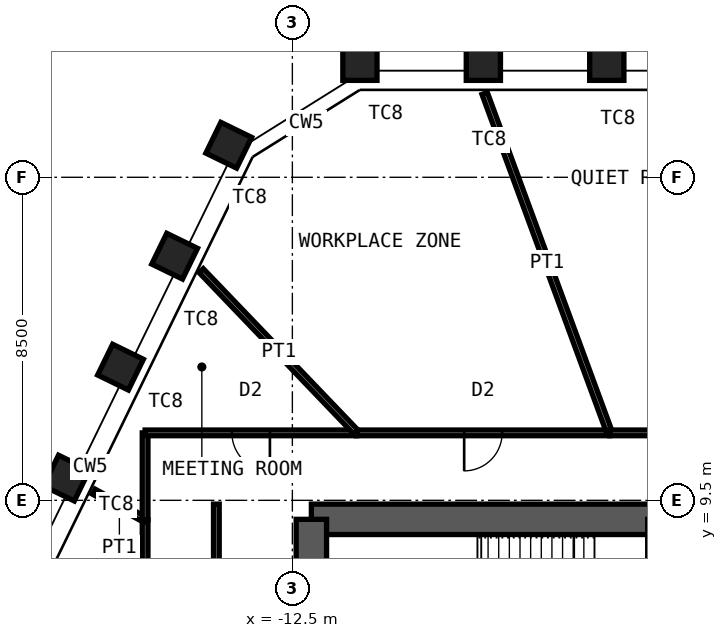
"""IFC4 building model, lengths in metres.
Left out: names, types, materials, properties, quantities, classifications, styles, units other than length and angle.
Written with IfcOpenShell. Run it as: python <this file> out.ifc"""

import sys

from ifc_helpers import new_model, si_unit, direction, frame, frame_2d, origin, origin_2d, place, context, subcontext, project, spatial, rectangle, hollow_rectangle, extrude, element, fill, save


model = new_model("IFC4")
c1 = context("Model", 3, precision=1e-05, world=origin(), true_north=direction((0.0, 1.0)))
c2 = subcontext(c1, "Body", "Model", "MODEL_VIEW")
j1 = project(units=[si_unit("LENGTHUNIT", "METRE"), si_unit("PLANEANGLEUNIT", "RADIAN")], contexts=[c1])
p1 = place(None, origin())
s1 = spatial("IfcSite", under=j1, at=p1, CompositionType="ELEMENT")
p2 = place(p1, origin())
s2 = spatial("IfcBuilding", under=s1, at=p2, CompositionType="ELEMENT")
p3 = place(p2, frame((0.0, 0.0, 308.2)))
s3 = spatial("IfcBuildingStorey", under=s2, at=p3, CompositionType="ELEMENT", Elevation=308.2)
for number, where, z_axis, x_axis in (
    (1, (-10.722, 21.0, 0.0), (0.0, 0.0, 1.0), (-1.0, 0.0, 0.0)),
    (2, (-7.474, 21.0, 0.0), (0.0, 0.0, 1.0), (-1.0, 0.0, 0.0)),
    (3, (-4.226, 21.0, 0.0), (0.0, 0.0, 1.0), (-1.0, 0.0, 0.0)),
    (4, (-18.446, 10.085, 0.0), (0.0, 0.0, 1.0), (-0.438, -0.899, 0.0)),
    (5, (-17.022, 13.004, 0.0), (0.0, 0.0, 1.0), (-0.438, -0.899, 0.0)),
    (6, (-15.598, 15.924, 0.0), (0.0, 0.0, 1.0), (-0.438, -0.899, 0.0)),
    (7, (-14.174, 18.843, 0.0), (0.0, 0.0, 1.0), (-0.438, -0.899, 0.0)),
):
    element("IfcColumn", number, at=place(p3, frame(where, z_axis=z_axis, x_axis=x_axis)), inside=s3, PredefinedType="COLUMN", context=c2, shape_type="SweptSolid", body=[
        extrude(hollow_rectangle(XDim=0.9, YDim=0.9, WallThickness=0.05, at=origin_2d()), origin(), (0.0, 0.0, 1.0), 4.2),
    ])
p4 = place(p3, frame((-12.0, 9.0, 0.0), z_axis=(0.0, 0.0, 1.0), x_axis=(1.0, 0.0, 0.0)))
e8 = element("IfcWall", 8, at=p4, inside=s3, PredefinedType="SHEAR", context=c2, shape_type="SweptSolid", body=[
    extrude(rectangle(XDim=24.0, YDim=0.8, at=frame_2d((12.0, 0.0))), origin(), (0.0, 0.0, 1.0), 4.2),
])
p5 = place(p4, frame((10.4, 0.0, 0.0)))
e9 = element("IfcOpeningElement", 9, at=p5, cuts=e8, PredefinedType="OPENING", context=c2, shape_type="SweptSolid", body=[
    extrude(rectangle(XDim=1.0, YDim=2.1, at=frame_2d((0.5, 1.05))), frame((0.0, 0.41, 0.0), z_axis=(0.0, -1.0, 0.0), x_axis=(1.0, 0.0, 0.0)), (0.0, 0.0, 1.0), 0.82),
])
p6 = place(p4, frame((17.6, 0.0, 0.0)))
e10 = element("IfcOpeningElement", 10, at=p6, cuts=e8, PredefinedType="OPENING", context=c2, shape_type="SweptSolid", body=[
    extrude(rectangle(XDim=0.9, YDim=2.1, at=frame_2d((0.45, 1.05))), frame((0.0, 0.41, 0.0), z_axis=(0.0, -1.0, 0.0), x_axis=(1.0, 0.0, 0.0)), (0.0, 0.0, 1.0), 0.82),
])
p7 = place(p4, frame((21.9, 0.0, 0.0)))
e11 = element("IfcOpeningElement", 11, at=p7, cuts=e8, PredefinedType="OPENING", context=c2, shape_type="SweptSolid", body=[
    extrude(rectangle(XDim=0.9, YDim=2.1, at=frame_2d((0.45, 1.05))), frame((0.0, 0.41, 0.0), z_axis=(0.0, -1.0, 0.0), x_axis=(1.0, 0.0, 0.0)), (0.0, 0.0, 1.0), 0.82),
])
p8 = place(p3, frame((-12.0, -9.0, 0.0), z_axis=(0.0, 0.0, 1.0), x_axis=(0.0, 1.0, 0.0)))
e12 = element("IfcWall", 12, at=p8, inside=s3, PredefinedType="SHEAR", context=c2, shape_type="SweptSolid", body=[
    extrude(rectangle(XDim=18.0, YDim=0.8, at=frame_2d((9.0, 0.0))), origin(), (0.0, 0.0, 1.0), 4.2),
])
p9 = place(p8, frame((8.1, 0.0, 0.0)))
e13 = element("IfcOpeningElement", 13, at=p9, cuts=e12, PredefinedType="OPENING", context=c2, shape_type="SweptSolid", body=[
    extrude(rectangle(XDim=1.8, YDim=2.1, at=frame_2d((0.9, 1.05))), frame((0.0, 0.41, 0.0), z_axis=(0.0, -1.0, 0.0), x_axis=(1.0, 0.0, 0.0)), (0.0, 0.0, 1.0), 0.82),
])
p10 = place(p3, frame((-16.375, 3.122, 0.0), z_axis=(0.0, 0.0, 1.0), x_axis=(0.0, 1.0, 0.0)))
e14 = element("IfcWall", 14, at=p10, inside=s3, PredefinedType="PARTITIONING", context=c2, shape_type="SweptSolid", body=[
    extrude(rectangle(XDim=5.865, YDim=0.15, at=frame_2d((2.933, 0.0))), origin(), (0.0, 0.0, 1.0), 4.03),
])
p11 = place(p10, frame((2.433, 0.0, 0.0)))
e15 = element("IfcOpeningElement", 15, at=p11, cuts=e14, PredefinedType="OPENING", context=c2, shape_type="SweptSolid", body=[
    extrude(rectangle(XDim=1.0, YDim=2.4, at=frame_2d((0.5, 1.2))), frame((0.0, 0.085, 0.0), z_axis=(0.0, -1.0, 0.0), x_axis=(1.0, 0.0, 0.0)), (0.0, 0.0, 1.0), 0.17),
])
p12 = place(p3, frame((-17.729, 9.73, 0.0), z_axis=(0.0, 0.0, 1.0), x_axis=(0.876636074137, -0.48115402266, 0.0)))
e16 = element("IfcWall", 16, at=p12, inside=s3, PredefinedType="PARTITIONING", context=c2, shape_type="SweptSolid", body=[
    extrude(rectangle(XDim=1.544, YDim=0.15, at=frame_2d((0.772, 0.0))), origin(), (0.0, 0.0, 1.0), 3.33),
])
p13 = place(p3, frame((-16.375, 8.987, 0.0), z_axis=(0.0, 0.0, 1.0), x_axis=(0.0, 1.0, 0.0)))
e17 = element("IfcWall", 17, at=p13, inside=s3, PredefinedType="PARTITIONING", context=c2, shape_type="SweptSolid", body=[
    extrude(rectangle(XDim=2.288, YDim=0.15, at=frame_2d((1.144, 0.0))), origin(), (0.0, 0.0, 1.0), 4.03),
])
p14 = place(p3, frame((-16.375, 11.275, 0.0), z_axis=(0.0, 0.0, 1.0), x_axis=(1.0, 0.0, 0.0)))
e18 = element("IfcWall", 18, at=p14, inside=s3, PredefinedType="PARTITIONING", context=c2, shape_type="SweptSolid", body=[
    extrude(rectangle(XDim=5.568, YDim=0.15, at=frame_2d((2.784, 0.0))), origin(), (0.0, 0.0, 1.0), 4.03),
])
p15 = place(p14, frame((2.284, 0.0, 0.0)))
e19 = element("IfcOpeningElement", 19, at=p15, cuts=e18, PredefinedType="OPENING", context=c2, shape_type="SweptSolid", body=[
    extrude(rectangle(XDim=1.0, YDim=2.4, at=frame_2d((0.5, 1.2))), frame((0.0, 0.085, 0.0), z_axis=(0.0, -1.0, 0.0), x_axis=(1.0, 0.0, 0.0)), (0.0, 0.0, 1.0), 0.17),
])
p16 = place(p3, frame((-14.9, 15.544, 0.0), z_axis=(0.0, 0.0, 1.0), x_axis=(0.691984258941, -0.72191258846, 0.0)))
e20 = element("IfcWall", 20, at=p16, inside=s3, PredefinedType="PARTITIONING", context=c2, shape_type="SweptSolid", body=[
    extrude(rectangle(XDim=5.914, YDim=0.15, at=frame_2d((2.957, 0.0))), origin(), (0.0, 0.0, 1.0), 4.03),
])
p17 = place(p3, frame((-10.807, 11.275, 0.0), z_axis=(0.0, 0.0, 1.0), x_axis=(1.0, 0.0, 0.0)))
e21 = element("IfcWall", 21, at=p17, inside=s3, PredefinedType="PARTITIONING", context=c2, shape_type="SweptSolid", body=[
    extrude(rectangle(XDim=6.656, YDim=0.15, at=frame_2d((3.328, 0.0))), origin(), (0.0, 0.0, 1.0), 4.03),
])
p18 = place(p17, frame((2.828, 0.0, 0.0)))
e22 = element("IfcOpeningElement", 22, at=p18, cuts=e21, PredefinedType="OPENING", context=c2, shape_type="SweptSolid", body=[
    extrude(rectangle(XDim=1.0, YDim=2.4, at=frame_2d((0.5, 1.2))), frame((0.0, 0.085, 0.0), z_axis=(0.0, -1.0, 0.0), x_axis=(1.0, 0.0, 0.0)), (0.0, 0.0, 1.0), 0.17),
])
p19 = place(p3, frame((-7.44, 20.206, 0.0), z_axis=(0.0, 0.0, 1.0), x_axis=(0.345511582319, -0.93841448544, 0.0)))
e23 = element("IfcWall", 23, at=p19, inside=s3, PredefinedType="PARTITIONING", context=c2, shape_type="SweptSolid", body=[
    extrude(rectangle(XDim=9.517, YDim=0.15, at=frame_2d((4.759, 0.0))), origin(), (0.0, 0.0, 1.0), 3.33),
])
p20 = place(p3, frame((-4.151, 11.275, 0.0), z_axis=(0.0, 0.0, 1.0), x_axis=(1.0, 0.0, 0.0)))
e24 = element("IfcWall", 24, at=p20, inside=s3, PredefinedType="PARTITIONING", context=c2, shape_type="SweptSolid", body=[
    extrude(rectangle(XDim=3.608, YDim=0.15, at=frame_2d((1.804, 0.0))), origin(), (0.0, 0.0, 1.0), 4.03),
])
p21 = place(p20, frame((1.304, 0.0, 0.0)))
e25 = element("IfcOpeningElement", 25, at=p21, cuts=e24, PredefinedType="OPENING", context=c2, shape_type="SweptSolid", body=[
    extrude(rectangle(XDim=1.0, YDim=2.4, at=frame_2d((0.5, 1.2))), frame((0.0, 0.085, 0.0), z_axis=(0.0, -1.0, 0.0), x_axis=(1.0, 0.0, 0.0)), (0.0, 0.0, 1.0), 0.17),
])
p22 = place(p3, frame((-14.5, 1.9, 0.0), z_axis=(0.0, 0.0, 1.0), x_axis=(0.0, 1.0, 0.0)))
e26 = element("IfcWall", 26, at=p22, inside=s3, PredefinedType="PARTITIONING", context=c2, shape_type="SweptSolid", body=[
    extrude(rectangle(XDim=7.5, YDim=0.15, at=frame_2d((3.75, 0.0))), origin(), (0.0, 0.0, 1.0), 4.03),
])
p23 = place(p15, origin())
e27 = element("IfcDoor", 27, at=p23, inside=s3, OperationType="SINGLE_SWING_RIGHT", PredefinedType="DOOR", context=c2, shape_type="SweptSolid", body=[
    extrude(rectangle(XDim=1.0, YDim=2.4, at=frame_2d((0.5, 1.2))), frame((0.0, 0.025, 0.0), z_axis=(0.0, -1.0, 0.0), x_axis=(1.0, 0.0, 0.0)), (0.0, 0.0, 1.0), 0.05),
])
fill(e19, e27)
p24 = place(p18, origin())
e28 = element("IfcDoor", 28, at=p24, inside=s3, OperationType="SINGLE_SWING_LEFT", PredefinedType="DOOR", context=c2, shape_type="SweptSolid", body=[
    extrude(rectangle(XDim=1.0, YDim=2.4, at=frame_2d((0.5, 1.2))), frame((0.0, 0.025, 0.0), z_axis=(0.0, -1.0, 0.0), x_axis=(1.0, 0.0, 0.0)), (0.0, 0.0, 1.0), 0.05),
])
fill(e22, e28)
save(model, sys.argv[1])
